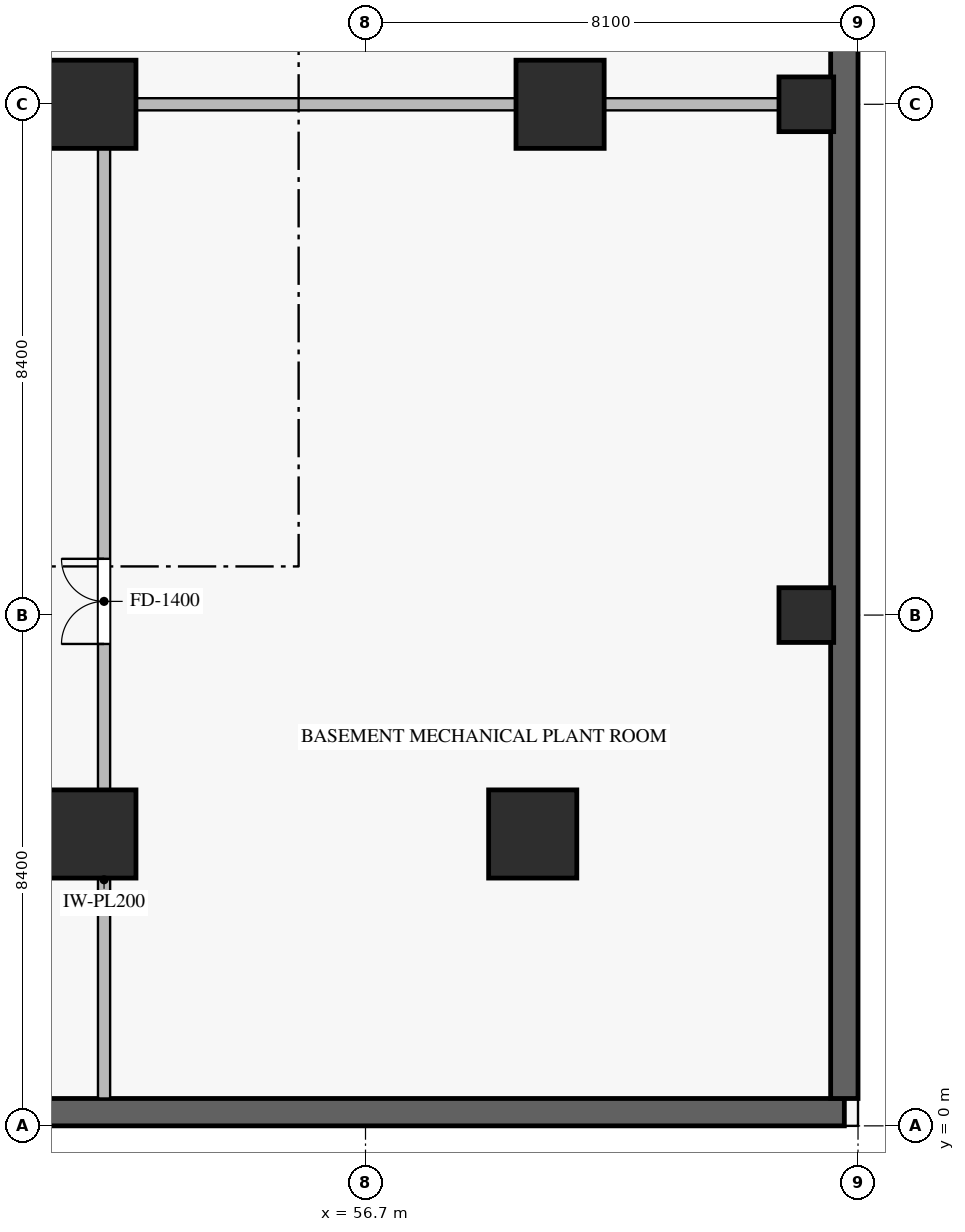
"""IFC4 building model, lengths in metres.
Left out: names, types, materials, properties, quantities, classifications, styles, units other than length and angle.
Written with IfcOpenShell. Run it as: python <this file> out.ifc"""

import sys

from ifc_helpers import new_model, si_unit, direction, frame, frame_2d, origin, origin_2d, place, context, subcontext, project, spatial, rectangle, extrude, source, transform, mapped, element, fill, save


model = new_model("IFC4")
c1 = context("Model", 3, precision=1e-05, world=origin(), true_north=direction((0.0, 1.0)))
c2 = subcontext(c1, "Body", "Model", "MODEL_VIEW")
j1 = project(units=[si_unit("LENGTHUNIT", "METRE"), si_unit("PLANEANGLEUNIT", "RADIAN")], contexts=[c1])
p1 = place(None, origin())
s1 = spatial("IfcSite", under=j1, at=p1, CompositionType="ELEMENT")
p2 = place(p1, origin())
s2 = spatial("IfcBuilding", under=s1, at=p2, CompositionType="ELEMENT")
p3 = place(p2, frame((0.0, 0.0, -7.2)))
s3 = spatial("IfcBuildingStorey", under=s2, at=p3, CompositionType="ELEMENT", Elevation=-7.2)
p4 = place(p3, frame((0.225, 0.225, -0.36), z_axis=(0.0, 0.0, 1.0), x_axis=(1.0, 0.0, 0.0)))
e1 = element("IfcWall", 1, at=p4, inside=s3, PredefinedType="USERDEFINED", context=c2, shape_type="SweptSolid", body=[
    extrude(rectangle(XDim=64.35, YDim=0.45, at=frame_2d((32.175, 0.0))), origin(), (0.0, 0.0, 1.0), 3.598),
])
p5 = place(p3, frame((64.575, 0.45, -0.36), z_axis=(0.0, 0.0, 1.0), x_axis=(0.0, 1.0, 0.0)))
e2 = element("IfcWall", 2, at=p5, inside=s3, PredefinedType="USERDEFINED", context=c2, shape_type="SweptSolid", body=[
    extrude(rectangle(XDim=49.5, YDim=0.45, at=frame_2d((24.75, 0.0))), origin(), (0.0, 0.0, 1.0), 3.598),
])
m1 = source(origin(), c2, "Body", "SweptSolid", [
    extrude(rectangle(XDim=0.9, YDim=0.9, at=origin_2d()), origin(), (0.0, 0.0, 1.0), 3.6),
])
for number, where, z_axis, x_axis in (
    (3, (63.95, 8.4, -0.36), (0.0, 0.0, 1.0), (1.0, 0.0, 0.0)),
    (4, (63.95, 16.8, -0.36), (0.0, 0.0, 1.0), (1.0, 0.0, 0.0)),
):
    element("IfcColumn", number, at=place(p3, frame(where, z_axis=z_axis, x_axis=x_axis)), inside=s3, PredefinedType="COLUMN", context=c2, shape_type="MappedRepresentation", body=[
        mapped(m1, transform((0.0, 0.0, 0.0), scale=1.0)),
    ])
m2 = source(origin(), c2, "Body", "SweptSolid", [
    extrude(rectangle(XDim=1.45, YDim=1.45, at=origin_2d()), origin(), (0.0, 0.0, 1.0), 3.6),
])
for number, where, z_axis, x_axis in (
    (5, (52.2, 4.8, -0.36), (0.0, 0.0, 1.0), (1.0, 0.0, 0.0)),
    (6, (52.2, 16.8, -0.36), (0.0, 0.0, 1.0), (1.0, 0.0, 0.0)),
    (7, (59.9, 16.8, -0.36), (0.0, 0.0, 1.0), (1.0, 0.0, 0.0)),
    (8, (59.45, 4.8, -0.36), (0.0, 0.0, 1.0), (1.0, 0.0, 0.0)),
):
    element("IfcColumn", number, at=place(p3, frame(where, z_axis=z_axis, x_axis=x_axis)), inside=s3, PredefinedType="COLUMN", context=c2, shape_type="MappedRepresentation", body=[
        mapped(m2, transform((0.0, 0.0, 0.0), scale=1.0)),
    ])
p6 = place(p3, frame((52.4, 0.45, 0.0), z_axis=(0.0, 0.0, 1.0), x_axis=(0.0, 1.0, 0.0)))
e9 = element("IfcWall", 9, at=p6, inside=s3, PredefinedType="STANDARD", context=c2, shape_type="SweptSolid", body=[
    extrude(rectangle(XDim=16.35, YDim=0.2, at=frame_2d((8.175, 0.0))), origin(), (0.0, 0.0, 1.0), 2.622),
])
p7 = place(p6, frame((7.475, 0.0, 0.0)))
e10 = element("IfcOpeningElement", 10, at=p7, cuts=e9, PredefinedType="OPENING", context=c2, shape_type="SweptSolid", body=[
    extrude(rectangle(XDim=1.4, YDim=2.2, at=frame_2d((0.7, 1.1))), frame((0.0, 0.11, 0.0), z_axis=(0.0, -1.0, 0.0), x_axis=(1.0, 0.0, 0.0)), (0.0, 0.0, 1.0), 0.22),
])
p8 = place(p3, frame((41.625, 16.8, 0.0), z_axis=(0.0, 0.0, 1.0), x_axis=(1.0, 0.0, 0.0)))
e11 = element("IfcWall", 11, at=p8, inside=s3, PredefinedType="STANDARD", context=c2, shape_type="SweptSolid", body=[
    extrude(rectangle(XDim=22.725, YDim=0.2, at=frame_2d((11.363, 0.0))), origin(), (0.0, 0.0, 1.0), 2.672),
])
p9 = place(p8, frame((4.697, 0.0, 0.0)))
e12 = element("IfcOpeningElement", 12, at=p9, cuts=e11, PredefinedType="OPENING", context=c2, shape_type="SweptSolid", body=[
    extrude(rectangle(XDim=3.8, YDim=2.5, at=frame_2d((1.9, 1.25))), frame((0.0, 0.11, 0.0), z_axis=(0.0, -1.0, 0.0), x_axis=(1.0, 0.0, 0.0)), (0.0, 0.0, 1.0), 0.22),
])
m3 = source(origin(), c2, "Body", "SweptSolid", [
    extrude(rectangle(XDim=1.4, YDim=2.2, at=frame_2d((0.7, 1.1))), frame((0.0, 0.025, 0.0), z_axis=(0.0, -1.0, 0.0), x_axis=(1.0, 0.0, 0.0)), (0.0, 0.0, 1.0), 0.05),
])
p10 = place(p7, origin())
e13 = element("IfcDoor", 13, at=p10, inside=s3, OperationType="DOUBLE_DOOR_SINGLE_SWING", PredefinedType="DOOR", context=c2, shape_type="MappedRepresentation", body=[
    mapped(m3, transform((0.0, 0.0, 0.0), scale=1.0)),
])
fill(e10, e13)
save(model, sys.argv[1])
